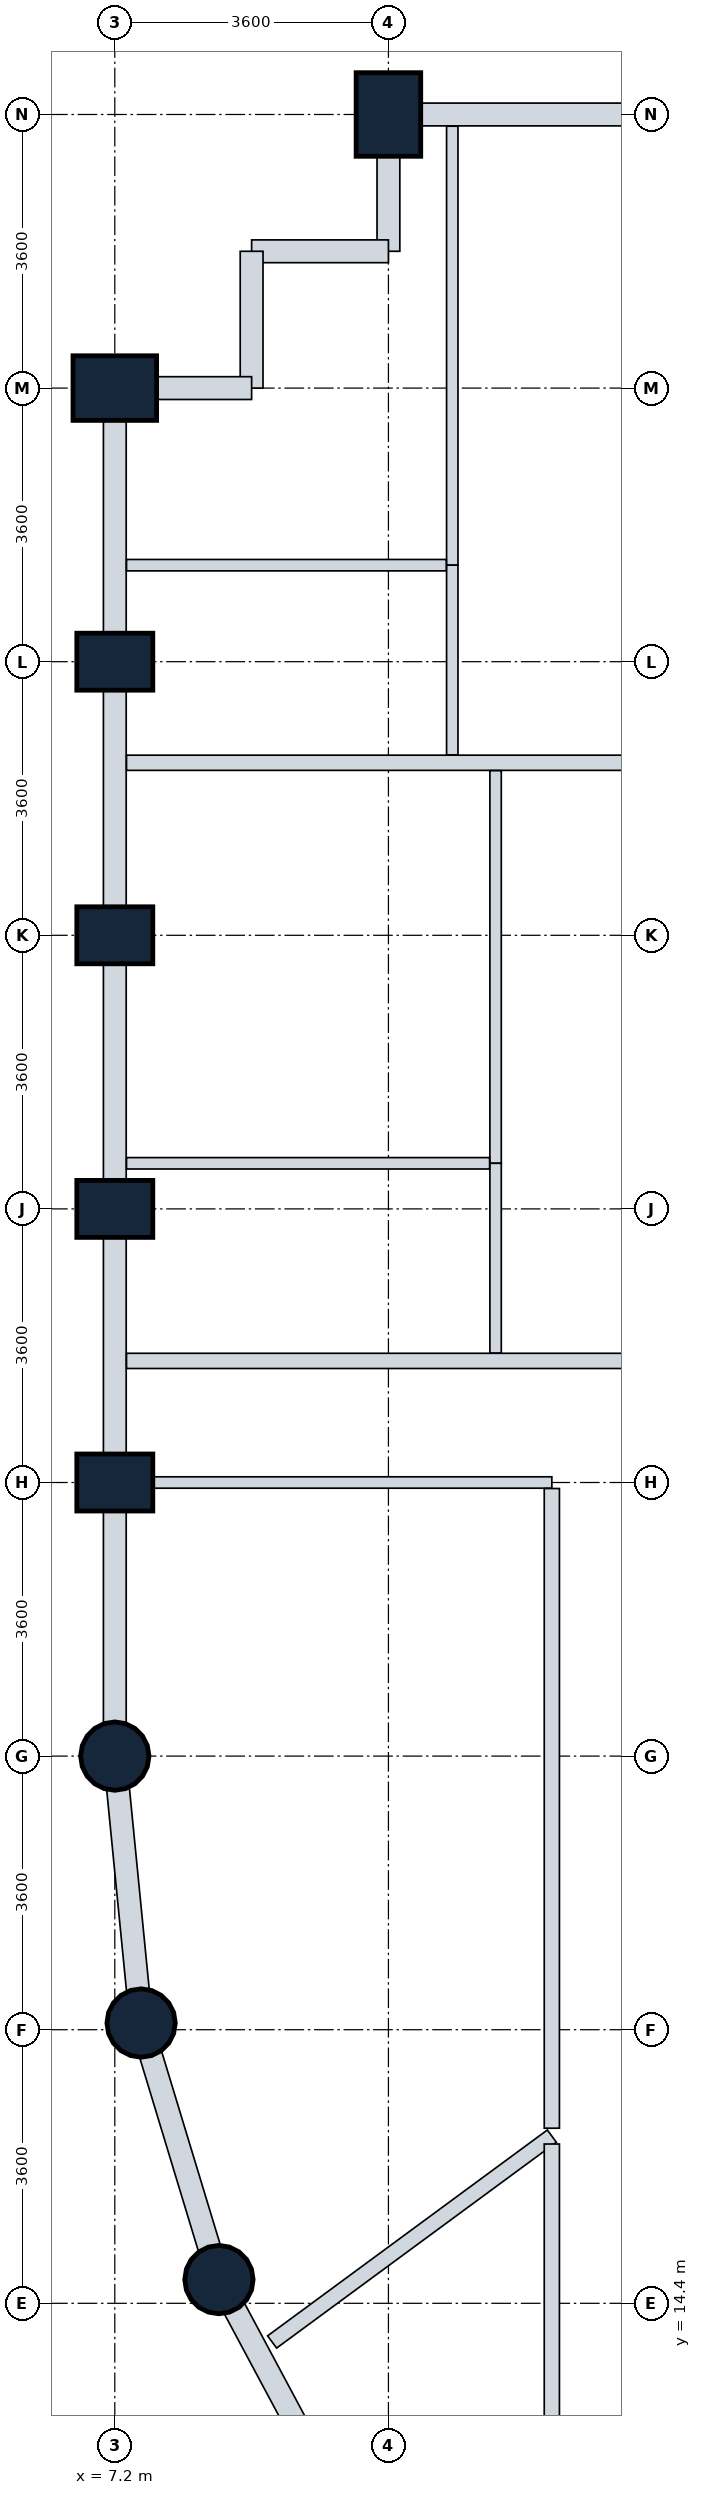
"""IFC4 building model, lengths in metres.
Left out: names, types, materials, properties, quantities, classifications, styles, units other than length and angle.
Written with IfcOpenShell. Run it as: python <this file> out.ifc"""

import sys

from ifc_helpers import new_model, si_unit, direction, frame, frame_2d, origin, origin_2d, place, context, subcontext, project, spatial, rectangle, circle, extrude, element, fill, save


model = new_model("IFC4")
c1 = context("Model", 3, precision=1e-05, world=origin(), true_north=direction((0.0, 1.0)))
c2 = subcontext(c1, "Body", "Model", "MODEL_VIEW")
j1 = project(units=[si_unit("LENGTHUNIT", "METRE"), si_unit("PLANEANGLEUNIT", "RADIAN")], contexts=[c1])
p1 = place(None, origin())
s1 = spatial("IfcSite", under=j1, at=p1, CompositionType="ELEMENT")
p2 = place(p1, origin())
s2 = spatial("IfcBuilding", under=s1, at=p2, CompositionType="ELEMENT")
p3 = place(p2, frame((0.0, 0.0, 139.0)))
s3 = spatial("IfcBuildingStorey", under=s2, at=p3, CompositionType="ELEMENT", Elevation=139.0)
p4 = place(p3, frame((7.2, 21.6, 0.0), z_axis=(0.0, 0.0, 1.0), x_axis=(1.0, 0.0, 0.0)))
e1 = element("IfcColumn", 1, at=p4, inside=s3, PredefinedType="COLUMN", context=c2, shape_type="SweptSolid", body=[
    extrude(circle(Radius=0.45, at=origin_2d()), origin(), (0.0, 0.0, 1.0), 3.8),
])
for number, where, z_axis, x_axis in (
    (2, (7.2, 25.2, 0.0), (0.0, 0.0, 1.0), (0.0, 1.0, 0.0)),
    (3, (7.2, 28.8, 0.0), (0.0, 0.0, 1.0), (0.0, 1.0, 0.0)),
    (4, (7.2, 32.4, 0.0), (0.0, 0.0, 1.0), (0.0, 1.0, 0.0)),
    (5, (7.2, 36.0, 0.0), (0.0, 0.0, 1.0), (0.0, 1.0, 0.0)),
):
    element("IfcColumn", number, at=place(p3, frame(where, z_axis=z_axis, x_axis=x_axis)), inside=s3, PredefinedType="COLUMN", context=c2, shape_type="SweptSolid", body=[
        extrude(rectangle(XDim=0.75, YDim=1.0, at=origin_2d()), origin(), (0.0, 0.0, 1.0), 3.8),
    ])
p5 = place(p3, frame((7.2, 39.6, 0.0), z_axis=(0.0, 0.0, 1.0), x_axis=(0.0, 1.0, 0.0)))
e6 = element("IfcColumn", 6, at=p5, inside=s3, PredefinedType="COLUMN", context=c2, shape_type="SweptSolid", body=[
    extrude(rectangle(XDim=0.85, YDim=1.1, at=origin_2d()), origin(), (0.0, 0.0, 1.0), 3.8),
])
for number, where, z_axis, x_axis in (
    (7, (7.546, 18.088, 0.0), (0.0, 0.0, 1.0), (1.0, 0.0, 0.0)),
    (8, (8.57, 14.712, 0.0), (0.0, 0.0, 1.0), (1.0, 0.0, 0.0)),
):
    element("IfcColumn", number, at=place(p3, frame(where, z_axis=z_axis, x_axis=x_axis)), inside=s3, PredefinedType="COLUMN", context=c2, shape_type="SweptSolid", body=[
        extrude(circle(Radius=0.45, at=origin_2d()), origin(), (0.0, 0.0, 1.0), 3.8),
    ])
p6 = place(p3, frame((10.8, 43.2, 0.0), z_axis=(0.0, 0.0, 1.0), x_axis=(1.0, 0.0, 0.0)))
e9 = element("IfcColumn", 9, at=p6, inside=s3, PredefinedType="COLUMN", context=c2, shape_type="SweptSolid", body=[
    extrude(rectangle(XDim=0.85, YDim=1.1, at=origin_2d()), origin(), (0.0, 0.0, 1.0), 3.8),
])
p7 = place(p3, frame((10.8, 43.2, 0.0), z_axis=(0.0, 0.0, 1.0), x_axis=(1.0, 0.0, 0.0)))
e10 = element("IfcWall", 10, at=p7, inside=s3, PredefinedType="STANDARD", context=c2, shape_type="SweptSolid", body=[
    extrude(rectangle(XDim=3.6, YDim=0.3, at=frame_2d((1.8, 0.0))), origin(), (0.0, 0.0, 1.0), 2.93),
])
p8 = place(p3, frame((10.8, 41.4, 0.0), z_axis=(0.0, 0.0, 1.0), x_axis=(0.0, 1.0, 0.0)))
e11 = element("IfcWall", 11, at=p8, inside=s3, PredefinedType="STANDARD", context=c2, shape_type="SweptSolid", body=[
    extrude(rectangle(XDim=1.8, YDim=0.3, at=frame_2d((0.9, 0.0))), origin(), (0.0, 0.0, 1.0), 2.93),
])
p9 = place(p8, frame((0.18, 0.0, 0.85)))
e12 = element("IfcOpeningElement", 12, at=p9, cuts=e11, PredefinedType="OPENING", context=c2, shape_type="SweptSolid", body=[
    extrude(rectangle(XDim=0.75, YDim=1.05, at=frame_2d((0.375, 0.525))), frame((0.0, 0.16, 0.0), z_axis=(0.0, -1.0, 0.0), x_axis=(1.0, 0.0, 0.0)), (0.0, 0.0, 1.0), 0.32),
])
p10 = place(p3, frame((9.0, 41.4, 0.0), z_axis=(0.0, 0.0, 1.0), x_axis=(1.0, 0.0, 0.0)))
e13 = element("IfcWall", 13, at=p10, inside=s3, PredefinedType="STANDARD", context=c2, shape_type="SweptSolid", body=[
    extrude(rectangle(XDim=1.8, YDim=0.3, at=frame_2d((0.9, 0.0))), origin(), (0.0, 0.0, 1.0), 3.535),
])
p11 = place(p3, frame((9.0, 39.6, 0.0), z_axis=(0.0, 0.0, 1.0), x_axis=(0.0, 1.0, 0.0)))
e14 = element("IfcWall", 14, at=p11, inside=s3, PredefinedType="STANDARD", context=c2, shape_type="SweptSolid", body=[
    extrude(rectangle(XDim=1.8, YDim=0.3, at=frame_2d((0.9, 0.0))), origin(), (0.0, 0.0, 1.0), 3.535),
])
p12 = place(p3, frame((7.2, 39.6, 0.0), z_axis=(0.0, 0.0, 1.0), x_axis=(1.0, 0.0, 0.0)))
e15 = element("IfcWall", 15, at=p12, inside=s3, PredefinedType="STANDARD", context=c2, shape_type="SweptSolid", body=[
    extrude(rectangle(XDim=1.8, YDim=0.3, at=frame_2d((0.9, 0.0))), origin(), (0.0, 0.0, 1.0), 2.93),
])
p13 = place(p3, frame((7.2, 36.0, 0.0), z_axis=(0.0, 0.0, 1.0), x_axis=(0.0, 1.0, 0.0)))
e16 = element("IfcWall", 16, at=p13, inside=s3, PredefinedType="STANDARD", context=c2, shape_type="SweptSolid", body=[
    extrude(rectangle(XDim=3.6, YDim=0.3, at=frame_2d((1.8, 0.0))), origin(), (0.0, 0.0, 1.0), 2.93),
])
p14 = place(p3, frame((7.2, 32.4, 0.0), z_axis=(0.0, 0.0, 1.0), x_axis=(0.0, 1.0, 0.0)))
e17 = element("IfcWall", 17, at=p14, inside=s3, PredefinedType="STANDARD", context=c2, shape_type="SweptSolid", body=[
    extrude(rectangle(XDim=3.6, YDim=0.3, at=frame_2d((1.8, 0.0))), origin(), (0.0, 0.0, 1.0), 2.93),
])
p15 = place(p14, frame((0.769, 0.0, 0.85)))
e18 = element("IfcOpeningElement", 18, at=p15, cuts=e17, PredefinedType="OPENING", context=c2, shape_type="SweptSolid", body=[
    extrude(rectangle(XDim=1.0, YDim=1.35, at=frame_2d((0.5, 0.675))), frame((0.0, 0.16, 0.0), z_axis=(0.0, -1.0, 0.0), x_axis=(1.0, 0.0, 0.0)), (0.0, 0.0, 1.0), 0.32),
])
p16 = place(p3, frame((7.2, 28.8, 0.0), z_axis=(0.0, 0.0, 1.0), x_axis=(0.0, 1.0, 0.0)))
e19 = element("IfcWall", 19, at=p16, inside=s3, PredefinedType="STANDARD", context=c2, shape_type="SweptSolid", body=[
    extrude(rectangle(XDim=3.6, YDim=0.3, at=frame_2d((1.8, 0.0))), origin(), (0.0, 0.0, 1.0), 2.93),
])
p17 = place(p3, frame((7.2, 25.2, 0.0), z_axis=(0.0, 0.0, 1.0), x_axis=(0.0, 1.0, 0.0)))
e20 = element("IfcWall", 20, at=p17, inside=s3, PredefinedType="STANDARD", context=c2, shape_type="SweptSolid", body=[
    extrude(rectangle(XDim=3.6, YDim=0.3, at=frame_2d((1.8, 0.0))), origin(), (0.0, 0.0, 1.0), 2.93),
])
p18 = place(p3, frame((7.2, 21.6, 0.0), z_axis=(0.0, 0.0, 1.0), x_axis=(0.0, 1.0, 0.0)))
e21 = element("IfcWall", 21, at=p18, inside=s3, PredefinedType="STANDARD", context=c2, shape_type="SweptSolid", body=[
    extrude(rectangle(XDim=3.6, YDim=0.3, at=frame_2d((1.8, 0.0))), origin(), (0.0, 0.0, 1.0), 2.93),
])
p19 = place(p18, frame((0.725, 0.0, 0.85)))
e22 = element("IfcOpeningElement", 22, at=p19, cuts=e21, PredefinedType="OPENING", context=c2, shape_type="SweptSolid", body=[
    extrude(rectangle(XDim=2.1, YDim=1.35, at=frame_2d((1.05, 0.675))), frame((0.0, 0.16, 0.0), z_axis=(0.0, -1.0, 0.0), x_axis=(1.0, 0.0, 0.0)), (0.0, 0.0, 1.0), 0.32),
])
p20 = place(p3, frame((7.546, 18.088, 0.0), z_axis=(0.0, 0.0, 1.0), x_axis=(-0.09802417461, 0.995184033831, 0.0)))
e23 = element("IfcWall", 23, at=p20, inside=s3, PredefinedType="STANDARD", context=c2, shape_type="SweptSolid", body=[
    extrude(rectangle(XDim=3.529, YDim=0.3, at=frame_2d((1.765, 0.0))), origin(), (0.0, 0.0, 1.0), 2.93),
])
p21 = place(p20, frame((0.965, 0.0, 0.85)))
e24 = element("IfcOpeningElement", 24, at=p21, cuts=e23, PredefinedType="OPENING", context=c2, shape_type="SweptSolid", body=[
    extrude(rectangle(XDim=1.6, YDim=1.35, at=frame_2d((0.8, 0.675))), frame((0.0, 0.16, 0.0), z_axis=(0.0, -1.0, 0.0), x_axis=(1.0, 0.0, 0.0)), (0.0, 0.0, 1.0), 0.32),
])
p22 = place(p3, frame((8.57, 14.712, 0.0), z_axis=(0.0, 0.0, 1.0), x_axis=(-0.290305086481, 0.956934144423, 0.0)))
e25 = element("IfcWall", 25, at=p22, inside=s3, PredefinedType="STANDARD", context=c2, shape_type="SweptSolid", body=[
    extrude(rectangle(XDim=3.528, YDim=0.3, at=frame_2d((1.764, 0.0))), origin(), (0.0, 0.0, 1.0), 2.93),
])
p23 = place(p22, frame((0.964, 0.0, 0.85)))
e26 = element("IfcOpeningElement", 26, at=p23, cuts=e25, PredefinedType="OPENING", context=c2, shape_type="SweptSolid", body=[
    extrude(rectangle(XDim=1.6, YDim=1.35, at=frame_2d((0.8, 0.675))), frame((0.0, 0.16, 0.0), z_axis=(0.0, -1.0, 0.0), x_axis=(1.0, 0.0, 0.0)), (0.0, 0.0, 1.0), 0.32),
])
p24 = place(p3, frame((10.234, 11.6, 0.0), z_axis=(0.0, 0.0, 1.0), x_axis=(-0.47151087309, 0.881860247748, 0.0)))
e27 = element("IfcWall", 27, at=p24, inside=s3, PredefinedType="STANDARD", context=c2, shape_type="SweptSolid", body=[
    extrude(rectangle(XDim=3.529, YDim=0.3, at=frame_2d((1.764, 0.0))), origin(), (0.0, 0.0, 1.0), 2.93),
])
p25 = place(p3, frame((7.354, 25.2, 0.0), z_axis=(0.0, 0.0, 1.0), x_axis=(1.0, 0.0, 0.0)))
e28 = element("IfcWall", 28, at=p25, inside=s3, PredefinedType="PARTITIONING", context=c2, shape_type="SweptSolid", body=[
    extrude(rectangle(XDim=5.596, YDim=0.15, at=frame_2d((2.798, 0.0))), origin(), (0.0, 0.0, 1.0), 3.535),
])
p26 = place(p3, frame((12.95, 16.6, 0.0), z_axis=(0.0, 0.0, 1.0), x_axis=(-0.805365932827, -0.592777963694, 0.0)))
e29 = element("IfcWall", 29, at=p26, inside=s3, PredefinedType="PARTITIONING", context=c2, shape_type="SweptSolid", body=[
    extrude(rectangle(XDim=4.57, YDim=0.2, at=frame_2d((2.285, 0.0))), origin(), (0.0, 0.0, 1.0), 2.93),
])
p27 = place(p3, frame((12.95, 16.704, 0.0), z_axis=(0.0, 0.0, 1.0), x_axis=(0.0, 1.0, 0.0)))
e30 = element("IfcWall", 30, at=p27, inside=s3, PredefinedType="PARTITIONING", context=c2, shape_type="SweptSolid", body=[
    extrude(rectangle(XDim=8.417, YDim=0.2, at=frame_2d((4.208, 0.0))), origin(), (0.0, 0.0, 1.0), 3.18),
])
p28 = place(p27, frame((3.696, 0.0, 0.0)))
e31 = element("IfcOpeningElement", 31, at=p28, cuts=e30, PredefinedType="OPENING", context=c2, shape_type="SweptSolid", body=[
    extrude(rectangle(XDim=1.0, YDim=2.1, at=frame_2d((0.5, 1.05))), frame((0.0, 0.11, 0.0), z_axis=(0.0, -1.0, 0.0), x_axis=(1.0, 0.0, 0.0)), (0.0, 0.0, 1.0), 0.22),
])
p29 = place(p3, frame((12.95, 9.619, 0.0), z_axis=(0.0, 0.0, 1.0), x_axis=(0.0, 1.0, 0.0)))
e32 = element("IfcWall", 32, at=p29, inside=s3, PredefinedType="PARTITIONING", context=c2, shape_type="SweptSolid", body=[
    extrude(rectangle(XDim=6.877, YDim=0.2, at=frame_2d((3.438, 0.0))), origin(), (0.0, 0.0, 1.0), 3.17),
])
p30 = place(p29, frame((3.962, 0.0, 0.0)))
e33 = element("IfcOpeningElement", 33, at=p30, cuts=e32, PredefinedType="OPENING", context=c2, shape_type="SweptSolid", body=[
    extrude(rectangle(XDim=1.0, YDim=2.1, at=frame_2d((0.5, 1.05))), frame((0.0, 0.11, 0.0), z_axis=(0.0, -1.0, 0.0), x_axis=(1.0, 0.0, 0.0)), (0.0, 0.0, 1.0), 0.22),
])
for number, where, z_axis, x_axis in (
    (34, (7.354, 26.8, 0.0), (0.0, 0.0, 1.0), (1.0, 0.0, 0.0)),
    (35, (7.354, 34.67, 0.0), (0.0, 0.0, 1.0), (1.0, 0.0, 0.0)),
):
    element("IfcWall", number, at=place(p3, frame(where, z_axis=z_axis, x_axis=x_axis)), inside=s3, PredefinedType="PARTITIONING", context=c2, shape_type="SweptSolid", body=[
        extrude(rectangle(XDim=14.046, YDim=0.2, at=frame_2d((7.023, 0.0))), origin(), (0.0, 0.0, 1.0), 2.93),
    ])
p31 = place(p3, frame((12.21, 29.4, 0.0), z_axis=(0.0, 0.0, 1.0), x_axis=(0.0, 1.0, 0.0)))
e36 = element("IfcWall", 36, at=p31, inside=s3, PredefinedType="PARTITIONING", context=c2, shape_type="SweptSolid", body=[
    extrude(rectangle(XDim=5.166, YDim=0.15, at=frame_2d((2.583, 0.0))), origin(), (0.0, 0.0, 1.0), 3.18),
])
p32 = place(p31, frame((2.185, 0.0, 0.0)))
e37 = element("IfcOpeningElement", 37, at=p32, cuts=e36, PredefinedType="OPENING", context=c2, shape_type="SweptSolid", body=[
    extrude(rectangle(XDim=0.9, YDim=2.1, at=frame_2d((0.45, 1.05))), frame((0.0, 0.085, 0.0), z_axis=(0.0, -1.0, 0.0), x_axis=(1.0, 0.0, 0.0)), (0.0, 0.0, 1.0), 0.17),
])
p33 = place(p3, frame((12.21, 26.904, 0.0), z_axis=(0.0, 0.0, 1.0), x_axis=(0.0, 1.0, 0.0)))
e38 = element("IfcWall", 38, at=p33, inside=s3, PredefinedType="PARTITIONING", context=c2, shape_type="SweptSolid", body=[
    extrude(rectangle(XDim=2.496, YDim=0.15, at=frame_2d((1.248, 0.0))), origin(), (0.0, 0.0, 1.0), 3.17),
])
p34 = place(p33, frame((0.731, 0.0, 0.0)))
e39 = element("IfcOpeningElement", 39, at=p34, cuts=e38, PredefinedType="OPENING", context=c2, shape_type="SweptSolid", body=[
    extrude(rectangle(XDim=0.85, YDim=2.1, at=frame_2d((0.425, 1.05))), frame((0.0, 0.085, 0.0), z_axis=(0.0, -1.0, 0.0), x_axis=(1.0, 0.0, 0.0)), (0.0, 0.0, 1.0), 0.17),
])
p35 = place(p3, frame((7.354, 29.4, 0.0), z_axis=(0.0, 0.0, 1.0), x_axis=(1.0, 0.0, 0.0)))
e40 = element("IfcWall", 40, at=p35, inside=s3, PredefinedType="PARTITIONING", context=c2, shape_type="SweptSolid", body=[
    extrude(rectangle(XDim=4.777, YDim=0.15, at=frame_2d((2.389, 0.0))), origin(), (0.0, 0.0, 1.0), 2.93),
])
p36 = place(p3, frame((11.64, 37.27, 0.0), z_axis=(0.0, 0.0, 1.0), x_axis=(0.0, 1.0, 0.0)))
e41 = element("IfcWall", 41, at=p36, inside=s3, PredefinedType="PARTITIONING", context=c2, shape_type="SweptSolid", body=[
    extrude(rectangle(XDim=5.776, YDim=0.15, at=frame_2d((2.888, 0.0))), origin(), (0.0, 0.0, 1.0), 2.93),
])
p37 = place(p36, frame((1.876, 0.0, 0.0)))
e42 = element("IfcOpeningElement", 42, at=p37, cuts=e41, PredefinedType="OPENING", context=c2, shape_type="SweptSolid", body=[
    extrude(rectangle(XDim=0.9, YDim=2.1, at=frame_2d((0.45, 1.05))), frame((0.0, 0.085, 0.0), z_axis=(0.0, -1.0, 0.0), x_axis=(1.0, 0.0, 0.0)), (0.0, 0.0, 1.0), 0.17),
])
p38 = place(p3, frame((11.64, 34.774, 0.0), z_axis=(0.0, 0.0, 1.0), x_axis=(0.0, 1.0, 0.0)))
e43 = element("IfcWall", 43, at=p38, inside=s3, PredefinedType="PARTITIONING", context=c2, shape_type="SweptSolid", body=[
    extrude(rectangle(XDim=2.496, YDim=0.15, at=frame_2d((1.248, 0.0))), origin(), (0.0, 0.0, 1.0), 3.17),
])
p39 = place(p38, frame((0.731, 0.0, 0.0)))
e44 = element("IfcOpeningElement", 44, at=p39, cuts=e43, PredefinedType="OPENING", context=c2, shape_type="SweptSolid", body=[
    extrude(rectangle(XDim=0.85, YDim=2.1, at=frame_2d((0.425, 1.05))), frame((0.0, 0.085, 0.0), z_axis=(0.0, -1.0, 0.0), x_axis=(1.0, 0.0, 0.0)), (0.0, 0.0, 1.0), 0.17),
])
p40 = place(p3, frame((7.354, 37.27, 0.0), z_axis=(0.0, 0.0, 1.0), x_axis=(1.0, 0.0, 0.0)))
e45 = element("IfcWall", 45, at=p40, inside=s3, PredefinedType="PARTITIONING", context=c2, shape_type="SweptSolid", body=[
    extrude(rectangle(XDim=4.207, YDim=0.15, at=frame_2d((2.104, 0.0))), origin(), (0.0, 0.0, 1.0), 2.93),
])
p41 = place(p19, origin())
e46 = element("IfcWindow", 46, at=p41, inside=s3, PartitioningType="SINGLE_PANEL", PredefinedType="WINDOW", context=c2, shape_type="SweptSolid", body=[
    extrude(rectangle(XDim=2.1, YDim=1.35, at=frame_2d((1.05, 0.675))), frame((0.0, 0.03, 0.0), z_axis=(0.0, -1.0, 0.0), x_axis=(1.0, 0.0, 0.0)), (0.0, 0.0, 1.0), 0.06),
])
fill(e22, e46)
p42 = place(p21, origin())
e47 = element("IfcWindow", 47, at=p42, inside=s3, PartitioningType="SINGLE_PANEL", PredefinedType="WINDOW", context=c2, shape_type="SweptSolid", body=[
    extrude(rectangle(XDim=1.6, YDim=1.35, at=frame_2d((0.8, 0.675))), frame((0.0, 0.03, 0.0), z_axis=(0.0, -1.0, 0.0), x_axis=(1.0, 0.0, 0.0)), (0.0, 0.0, 1.0), 0.06),
])
fill(e24, e47)
p43 = place(p23, origin())
e48 = element("IfcWindow", 48, at=p43, inside=s3, PartitioningType="SINGLE_PANEL", PredefinedType="WINDOW", context=c2, shape_type="SweptSolid", body=[
    extrude(rectangle(XDim=1.6, YDim=1.35, at=frame_2d((0.8, 0.675))), frame((0.0, 0.03, 0.0), z_axis=(0.0, -1.0, 0.0), x_axis=(1.0, 0.0, 0.0)), (0.0, 0.0, 1.0), 0.06),
])
fill(e26, e48)
p44 = place(p28, origin())
e49 = element("IfcDoor", 49, at=p44, inside=s3, OperationType="SINGLE_SWING_LEFT", PredefinedType="DOOR", context=c2, shape_type="SweptSolid", body=[
    extrude(rectangle(XDim=1.0, YDim=2.1, at=frame_2d((0.5, 1.05))), frame((0.0, 0.025, 0.0), z_axis=(0.0, -1.0, 0.0), x_axis=(1.0, 0.0, 0.0)), (0.0, 0.0, 1.0), 0.05),
])
fill(e31, e49)
p45 = place(p30, origin())
e50 = element("IfcDoor", 50, at=p45, inside=s3, OperationType="SINGLE_SWING_RIGHT", PredefinedType="DOOR", context=c2, shape_type="SweptSolid", body=[
    extrude(rectangle(XDim=1.0, YDim=2.1, at=frame_2d((0.5, 1.05))), frame((0.0, 0.025, 0.0), z_axis=(0.0, -1.0, 0.0), x_axis=(1.0, 0.0, 0.0)), (0.0, 0.0, 1.0), 0.05),
])
fill(e33, e50)
p46 = place(p32, origin())
e51 = element("IfcDoor", 51, at=p46, inside=s3, OperationType="SINGLE_SWING_LEFT", PredefinedType="DOOR", context=c2, shape_type="SweptSolid", body=[
    extrude(rectangle(XDim=0.9, YDim=2.1, at=frame_2d((0.45, 1.05))), frame((0.0, 0.025, 0.0), z_axis=(0.0, -1.0, 0.0), x_axis=(1.0, 0.0, 0.0)), (0.0, 0.0, 1.0), 0.05),
])
fill(e37, e51)
p47 = place(p34, origin())
e52 = element("IfcDoor", 52, at=p47, inside=s3, OperationType="SINGLE_SWING_RIGHT", PredefinedType="DOOR", context=c2, shape_type="SweptSolid", body=[
    extrude(rectangle(XDim=0.85, YDim=2.1, at=frame_2d((0.425, 1.05))), frame((0.0, 0.025, 0.0), z_axis=(0.0, -1.0, 0.0), x_axis=(1.0, 0.0, 0.0)), (0.0, 0.0, 1.0), 0.05),
])
fill(e39, e52)
p48 = place(p37, origin())
e53 = element("IfcDoor", 53, at=p48, inside=s3, OperationType="SINGLE_SWING_LEFT", PredefinedType="DOOR", context=c2, shape_type="SweptSolid", body=[
    extrude(rectangle(XDim=0.9, YDim=2.1, at=frame_2d((0.45, 1.05))), frame((0.0, 0.025, 0.0), z_axis=(0.0, -1.0, 0.0), x_axis=(1.0, 0.0, 0.0)), (0.0, 0.0, 1.0), 0.05),
])
fill(e42, e53)
p49 = place(p39, origin())
e54 = element("IfcDoor", 54, at=p49, inside=s3, OperationType="SINGLE_SWING_RIGHT", PredefinedType="DOOR", context=c2, shape_type="SweptSolid", body=[
    extrude(rectangle(XDim=0.85, YDim=2.1, at=frame_2d((0.425, 1.05))), frame((0.0, 0.025, 0.0), z_axis=(0.0, -1.0, 0.0), x_axis=(1.0, 0.0, 0.0)), (0.0, 0.0, 1.0), 0.05),
])
fill(e44, e54)
p50 = place(p15, origin())
e55 = element("IfcWindow", 55, at=p50, inside=s3, PartitioningType="SINGLE_PANEL", PredefinedType="WINDOW", context=c2, shape_type="SweptSolid", body=[
    extrude(rectangle(XDim=1.0, YDim=1.35, at=frame_2d((0.5, 0.675))), frame((0.0, 0.03, 0.0), z_axis=(0.0, -1.0, 0.0), x_axis=(1.0, 0.0, 0.0)), (0.0, 0.0, 1.0), 0.06),
])
fill(e18, e55)
p51 = place(p9, origin())
e56 = element("IfcWindow", 56, at=p51, inside=s3, PartitioningType="SINGLE_PANEL", PredefinedType="WINDOW", context=c2, shape_type="SweptSolid", body=[
    extrude(rectangle(XDim=0.75, YDim=1.05, at=frame_2d((0.375, 0.525))), frame((0.0, 0.03, 0.0), z_axis=(0.0, -1.0, 0.0), x_axis=(1.0, 0.0, 0.0)), (0.0, 0.0, 1.0), 0.06),
])
fill(e12, e56)
save(model, sys.argv[1])
